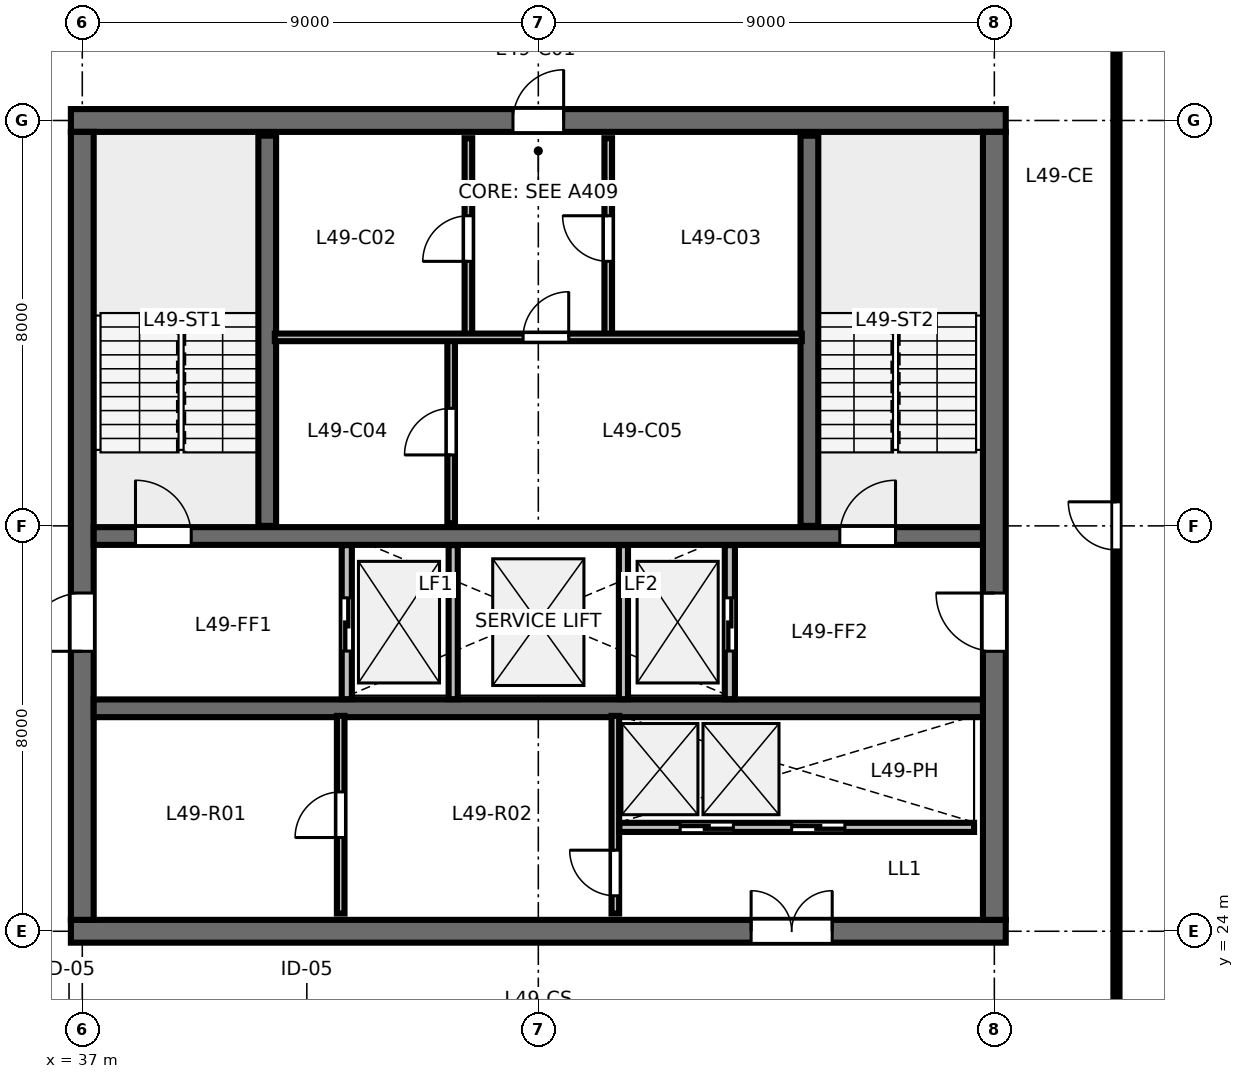
"""IFC4 building model, lengths in metres.
Left out: names, types, materials, properties, quantities, classifications, styles, units other than length and angle.
Written with IfcOpenShell. Run it as: python <this file> out.ifc"""

import sys

from ifc_helpers import new_model, si_unit, direction, frame, frame_2d, origin, place, context, subcontext, project, spatial, rectangle, extrude, element, fill, save


model = new_model("IFC4")
c1 = context("Model", 3, precision=1e-05, world=origin(), true_north=direction((0.0, 1.0)))
c2 = subcontext(c1, "Body", "Model", "MODEL_VIEW")
j1 = project(units=[si_unit("LENGTHUNIT", "METRE"), si_unit("PLANEANGLEUNIT", "RADIAN")], contexts=[c1])
p1 = place(None, origin())
s1 = spatial("IfcSite", under=j1, at=p1, CompositionType="ELEMENT")
p2 = place(p1, origin())
s2 = spatial("IfcBuilding", under=s1, at=p2, CompositionType="ELEMENT")
p3 = place(p2, frame((0.0, 0.0, 187.8)))
s3 = spatial("IfcBuildingStorey", under=s2, at=p3, CompositionType="ELEMENT", Elevation=187.8)
p4 = place(p3, frame((36.775, 24.0, 0.0), z_axis=(0.0, 0.0, 1.0), x_axis=(1.0, 0.0, 0.0)))
e1 = element("IfcWall", 1, at=p4, inside=s3, PredefinedType="SHEAR", context=c2, shape_type="SweptSolid", body=[
    extrude(rectangle(XDim=18.45, YDim=0.45, at=frame_2d((9.225, 0.0))), origin(), (0.0, 0.0, 1.0), 3.36),
])
p5 = place(p4, frame((13.425, 0.0, 0.0)))
e2 = element("IfcOpeningElement", 2, at=p5, cuts=e1, PredefinedType="OPENING", context=c2, shape_type="SweptSolid", body=[
    extrude(rectangle(XDim=1.6, YDim=2.15, at=frame_2d((0.8, 1.075))), frame((0.0, 0.235, 0.0), z_axis=(0.0, -1.0, 0.0), x_axis=(1.0, 0.0, 0.0)), (0.0, 0.0, 1.0), 0.47),
])
p6 = place(p3, frame((36.775, 40.0, 0.0), z_axis=(0.0, 0.0, 1.0), x_axis=(1.0, 0.0, 0.0)))
e3 = element("IfcWall", 3, at=p6, inside=s3, PredefinedType="SHEAR", context=c2, shape_type="SweptSolid", body=[
    extrude(rectangle(XDim=18.45, YDim=0.45, at=frame_2d((9.225, 0.0))), origin(), (0.0, 0.0, 1.0), 3.36),
])
p7 = place(p6, frame((8.725, 0.0, 0.0)))
e4 = element("IfcOpeningElement", 4, at=p7, cuts=e3, PredefinedType="OPENING", context=c2, shape_type="SweptSolid", body=[
    extrude(rectangle(XDim=1.0, YDim=2.15, at=frame_2d((0.5, 1.075))), frame((0.0, 0.235, 0.0), z_axis=(0.0, -1.0, 0.0), x_axis=(1.0, 0.0, 0.0)), (0.0, 0.0, 1.0), 0.47),
])
p8 = place(p3, frame((37.0, 24.225, 0.0), z_axis=(0.0, 0.0, 1.0), x_axis=(0.0, 1.0, 0.0)))
e5 = element("IfcWall", 5, at=p8, inside=s3, PredefinedType="SHEAR", context=c2, shape_type="SweptSolid", body=[
    extrude(rectangle(XDim=15.55, YDim=0.45, at=frame_2d((7.775, 0.0))), origin(), (0.0, 0.0, 1.0), 3.36),
])
p9 = place(p8, frame((5.3, 0.0, 0.0)))
e6 = element("IfcOpeningElement", 6, at=p9, cuts=e5, PredefinedType="OPENING", context=c2, shape_type="SweptSolid", body=[
    extrude(rectangle(XDim=1.15, YDim=2.15, at=frame_2d((0.575, 1.075))), frame((0.0, 0.235, 0.0), z_axis=(0.0, -1.0, 0.0), x_axis=(1.0, 0.0, 0.0)), (0.0, 0.0, 1.0), 0.47),
])
p10 = place(p3, frame((55.0, 24.225, 0.0), z_axis=(0.0, 0.0, 1.0), x_axis=(0.0, 1.0, 0.0)))
e7 = element("IfcWall", 7, at=p10, inside=s3, PredefinedType="SHEAR", context=c2, shape_type="SweptSolid", body=[
    extrude(rectangle(XDim=15.55, YDim=0.45, at=frame_2d((7.775, 0.0))), origin(), (0.0, 0.0, 1.0), 3.36),
])
p11 = place(p10, frame((5.3, 0.0, 0.0)))
e8 = element("IfcOpeningElement", 8, at=p11, cuts=e7, PredefinedType="OPENING", context=c2, shape_type="SweptSolid", body=[
    extrude(rectangle(XDim=1.15, YDim=2.15, at=frame_2d((0.575, 1.075))), frame((0.0, 0.235, 0.0), z_axis=(0.0, -1.0, 0.0), x_axis=(1.0, 0.0, 0.0)), (0.0, 0.0, 1.0), 0.47),
])
p12 = place(p3, frame((37.225, 31.8, 0.0), z_axis=(0.0, 0.0, 1.0), x_axis=(1.0, 0.0, 0.0)))
e9 = element("IfcWall", 9, at=p12, inside=s3, PredefinedType="SHEAR", context=c2, shape_type="SweptSolid", body=[
    extrude(rectangle(XDim=17.55, YDim=0.35, at=frame_2d((8.775, 0.0))), origin(), (0.0, 0.0, 1.0), 3.36),
])
p13 = place(p12, frame((0.825, 0.0, 0.0)))
e10 = element("IfcOpeningElement", 10, at=p13, cuts=e9, PredefinedType="OPENING", context=c2, shape_type="SweptSolid", body=[
    extrude(rectangle(XDim=1.1, YDim=2.15, at=frame_2d((0.55, 1.075))), frame((0.0, 0.185, 0.0), z_axis=(0.0, -1.0, 0.0), x_axis=(1.0, 0.0, 0.0)), (0.0, 0.0, 1.0), 0.37),
])
p14 = place(p12, frame((14.725, 0.0, 0.0)))
e11 = element("IfcOpeningElement", 11, at=p14, cuts=e9, PredefinedType="OPENING", context=c2, shape_type="SweptSolid", body=[
    extrude(rectangle(XDim=1.1, YDim=2.15, at=frame_2d((0.55, 1.075))), frame((0.0, 0.185, 0.0), z_axis=(0.0, -1.0, 0.0), x_axis=(1.0, 0.0, 0.0)), (0.0, 0.0, 1.0), 0.37),
])
p15 = place(p3, frame((37.225, 28.4, 0.0), z_axis=(0.0, 0.0, 1.0), x_axis=(1.0, 0.0, 0.0)))
e12 = element("IfcWall", 12, at=p15, inside=s3, PredefinedType="SHEAR", context=c2, shape_type="SweptSolid", body=[
    extrude(rectangle(XDim=17.55, YDim=0.35, at=frame_2d((8.775, 0.0))), origin(), (0.0, 0.0, 1.0), 3.36),
])
for number, where, z_axis, x_axis in (
    (13, (40.65, 32.0, 0.0), (0.0, 0.0, 1.0), (0.0, 1.0, 0.0)),
    (14, (51.35, 32.0, 0.0), (0.0, 0.0, 1.0), (0.0, 1.0, 0.0)),
):
    element("IfcWall", number, at=place(p3, frame(where, z_axis=z_axis, x_axis=x_axis)), inside=s3, PredefinedType="SHEAR", context=c2, shape_type="SweptSolid", body=[
        extrude(rectangle(XDim=7.7, YDim=0.35, at=frame_2d((3.85, 0.0))), origin(), (0.0, 0.0, 1.0), 3.6),
    ])
p16 = place(p3, frame((44.62, 35.72, 0.0), z_axis=(0.0, 0.0, 1.0), x_axis=(0.0, 1.0, 0.0)))
e15 = element("IfcWall", 15, at=p16, inside=s3, PredefinedType="PARTITIONING", context=c2, shape_type="SweptSolid", body=[
    extrude(rectangle(XDim=3.93, YDim=0.15, at=frame_2d((1.965, 0.0))), origin(), (0.0, 0.0, 1.0), 3.375),
])
p17 = place(p16, frame((1.5, 0.0, 0.0)))
e16 = element("IfcOpeningElement", 16, at=p17, cuts=e15, PredefinedType="OPENING", context=c2, shape_type="SweptSolid", body=[
    extrude(rectangle(XDim=0.9, YDim=2.15, at=frame_2d((0.45, 1.075))), frame((0.0, 0.085, 0.0), z_axis=(0.0, -1.0, 0.0), x_axis=(1.0, 0.0, 0.0)), (0.0, 0.0, 1.0), 0.17),
])
p18 = place(p3, frame((47.38, 35.72, 0.0), z_axis=(0.0, 0.0, 1.0), x_axis=(0.0, 1.0, 0.0)))
e17 = element("IfcWall", 17, at=p18, inside=s3, PredefinedType="PARTITIONING", context=c2, shape_type="SweptSolid", body=[
    extrude(rectangle(XDim=3.93, YDim=0.15, at=frame_2d((1.965, 0.0))), origin(), (0.0, 0.0, 1.0), 3.375),
])
p19 = place(p18, frame((1.5, 0.0, 0.0)))
e18 = element("IfcOpeningElement", 18, at=p19, cuts=e17, PredefinedType="OPENING", context=c2, shape_type="SweptSolid", body=[
    extrude(rectangle(XDim=0.9, YDim=2.15, at=frame_2d((0.45, 1.075))), frame((0.0, 0.085, 0.0), z_axis=(0.0, -1.0, 0.0), x_axis=(1.0, 0.0, 0.0)), (0.0, 0.0, 1.0), 0.17),
])
p20 = place(p3, frame((44.28, 32.05, 0.0), z_axis=(0.0, 0.0, 1.0), x_axis=(0.0, 1.0, 0.0)))
e19 = element("IfcWall", 19, at=p20, inside=s3, PredefinedType="PARTITIONING", context=c2, shape_type="SweptSolid", body=[
    extrude(rectangle(XDim=3.67, YDim=0.15, at=frame_2d((1.835, 0.0))), origin(), (0.0, 0.0, 1.0), 3.375),
])
p21 = place(p20, frame((1.35, 0.0, 0.0)))
e20 = element("IfcOpeningElement", 20, at=p21, cuts=e19, PredefinedType="OPENING", context=c2, shape_type="SweptSolid", body=[
    extrude(rectangle(XDim=0.92, YDim=2.15, at=frame_2d((0.46, 1.075))), frame((0.0, 0.085, 0.0), z_axis=(0.0, -1.0, 0.0), x_axis=(1.0, 0.0, 0.0)), (0.0, 0.0, 1.0), 0.17),
])
p22 = place(p3, frame((40.8, 35.72, 0.0), z_axis=(0.0, 0.0, 1.0), x_axis=(1.0, 0.0, 0.0)))
e21 = element("IfcWall", 21, at=p22, inside=s3, PredefinedType="PARTITIONING", context=c2, shape_type="SweptSolid", body=[
    extrude(rectangle(XDim=10.4, YDim=0.15, at=frame_2d((5.2, 0.0))), origin(), (0.0, 0.0, 1.0), 3.375),
])
p23 = place(p22, frame((4.9, 0.0, 0.0)))
e22 = element("IfcOpeningElement", 22, at=p23, cuts=e21, PredefinedType="OPENING", context=c2, shape_type="SweptSolid", body=[
    extrude(rectangle(XDim=0.9, YDim=2.15, at=frame_2d((0.45, 1.075))), frame((0.0, 0.085, 0.0), z_axis=(0.0, -1.0, 0.0), x_axis=(1.0, 0.0, 0.0)), (0.0, 0.0, 1.0), 0.17),
])
p24 = place(p3, frame((42.22, 28.58, 0.0), z_axis=(0.0, 0.0, 1.0), x_axis=(0.0, 1.0, 0.0)))
e23 = element("IfcWall", 23, at=p24, inside=s3, PredefinedType="PARTITIONING", context=c2, shape_type="SweptSolid", body=[
    extrude(rectangle(XDim=3.04, YDim=0.2, at=frame_2d((1.52, 0.0))), origin(), (0.0, 0.0, 1.0), 3.375),
])
p25 = place(p24, frame((0.95, 0.0, 0.0)))
e24 = element("IfcOpeningElement", 24, at=p25, cuts=e23, PredefinedType="OPENING", context=c2, shape_type="SweptSolid", body=[
    extrude(rectangle(XDim=1.05, YDim=2.15, at=frame_2d((0.525, 1.075))), frame((0.0, 0.11, 0.0), z_axis=(0.0, -1.0, 0.0), x_axis=(1.0, 0.0, 0.0)), (0.0, 0.0, 1.0), 0.22),
])
p26 = place(p3, frame((49.78, 28.58, 0.0), z_axis=(0.0, 0.0, 1.0), x_axis=(0.0, 1.0, 0.0)))
e25 = element("IfcWall", 25, at=p26, inside=s3, PredefinedType="PARTITIONING", context=c2, shape_type="SweptSolid", body=[
    extrude(rectangle(XDim=3.04, YDim=0.2, at=frame_2d((1.52, 0.0))), origin(), (0.0, 0.0, 1.0), 3.375),
])
p27 = place(p26, frame((0.95, 0.0, 0.0)))
e26 = element("IfcOpeningElement", 26, at=p27, cuts=e25, PredefinedType="OPENING", context=c2, shape_type="SweptSolid", body=[
    extrude(rectangle(XDim=1.05, YDim=2.15, at=frame_2d((0.525, 1.075))), frame((0.0, 0.11, 0.0), z_axis=(0.0, -1.0, 0.0), x_axis=(1.0, 0.0, 0.0)), (0.0, 0.0, 1.0), 0.22),
])
for number, where, z_axis, x_axis in (
    (27, (44.32, 28.58, 0.0), (0.0, 0.0, 1.0), (0.0, 1.0, 0.0)),
    (28, (47.68, 28.58, 0.0), (0.0, 0.0, 1.0), (0.0, 1.0, 0.0)),
):
    element("IfcWall", number, at=place(p3, frame(where, z_axis=z_axis, x_axis=x_axis)), inside=s3, PredefinedType="PARTITIONING", context=c2, shape_type="SweptSolid", body=[
        extrude(rectangle(XDim=3.04, YDim=0.18, at=frame_2d((1.52, 0.0))), origin(), (0.0, 0.0, 1.0), 3.375),
    ])
p28 = place(p3, frame((42.1, 24.35, 0.0), z_axis=(0.0, 0.0, 1.0), x_axis=(0.0, 1.0, 0.0)))
e29 = element("IfcWall", 29, at=p28, inside=s3, PredefinedType="PARTITIONING", context=c2, shape_type="SweptSolid", body=[
    extrude(rectangle(XDim=3.9, YDim=0.15, at=frame_2d((1.95, 0.0))), origin(), (0.0, 0.0, 1.0), 3.375),
])
p29 = place(p28, frame((1.5, 0.0, 0.0)))
e30 = element("IfcOpeningElement", 30, at=p29, cuts=e29, PredefinedType="OPENING", context=c2, shape_type="SweptSolid", body=[
    extrude(rectangle(XDim=0.9, YDim=2.15, at=frame_2d((0.45, 1.075))), frame((0.0, 0.085, 0.0), z_axis=(0.0, -1.0, 0.0), x_axis=(1.0, 0.0, 0.0)), (0.0, 0.0, 1.0), 0.17),
])
p30 = place(p3, frame((47.52, 24.35, 0.0), z_axis=(0.0, 0.0, 1.0), x_axis=(0.0, 1.0, 0.0)))
e31 = element("IfcWall", 31, at=p30, inside=s3, PredefinedType="PARTITIONING", context=c2, shape_type="SweptSolid", body=[
    extrude(rectangle(XDim=3.9, YDim=0.15, at=frame_2d((1.95, 0.0))), origin(), (0.0, 0.0, 1.0), 3.375),
])
p31 = place(p30, frame((0.35, 0.0, 0.0)))
e32 = element("IfcOpeningElement", 32, at=p31, cuts=e31, PredefinedType="OPENING", context=c2, shape_type="SweptSolid", body=[
    extrude(rectangle(XDim=0.9, YDim=2.15, at=frame_2d((0.45, 1.075))), frame((0.0, 0.085, 0.0), z_axis=(0.0, -1.0, 0.0), x_axis=(1.0, 0.0, 0.0)), (0.0, 0.0, 1.0), 0.17),
])
p32 = place(p3, frame((47.6, 26.05, 0.0), z_axis=(0.0, 0.0, 1.0), x_axis=(1.0, 0.0, 0.0)))
e33 = element("IfcWall", 33, at=p32, inside=s3, PredefinedType="PARTITIONING", context=c2, shape_type="SweptSolid", body=[
    extrude(rectangle(XDim=7.0, YDim=0.18, at=frame_2d((3.5, 0.0))), origin(), (0.0, 0.0, 1.0), 3.375),
])
p33 = place(p32, frame((1.2, 0.0, 0.0)))
e34 = element("IfcOpeningElement", 34, at=p33, cuts=e33, PredefinedType="OPENING", context=c2, shape_type="SweptSolid", body=[
    extrude(rectangle(XDim=1.05, YDim=2.15, at=frame_2d((0.525, 1.075))), frame((0.0, 0.1, 0.0), z_axis=(0.0, -1.0, 0.0), x_axis=(1.0, 0.0, 0.0)), (0.0, 0.0, 1.0), 0.2),
])
p34 = place(p32, frame((3.4, 0.0, 0.0)))
e35 = element("IfcOpeningElement", 35, at=p34, cuts=e33, PredefinedType="OPENING", context=c2, shape_type="SweptSolid", body=[
    extrude(rectangle(XDim=1.05, YDim=2.15, at=frame_2d((0.525, 1.075))), frame((0.0, 0.1, 0.0), z_axis=(0.0, -1.0, 0.0), x_axis=(1.0, 0.0, 0.0)), (0.0, 0.0, 1.0), 0.2),
])
p35 = place(p3, frame((57.41, 21.65, 0.0), z_axis=(0.0, 0.0, 1.0), x_axis=(0.0, 1.0, 0.0)))
e36 = element("IfcWall", 36, at=p35, inside=s3, PredefinedType="PARTITIONING", context=c2, shape_type="SweptSolid", body=[
    extrude(rectangle(XDim=20.7, YDim=0.12, at=frame_2d((10.35, 0.0))), origin(), (0.0, 0.0, 1.0), 2.655),
])
p36 = place(p35, frame((9.875, 0.0, 0.0)))
e37 = element("IfcOpeningElement", 37, at=p36, cuts=e36, PredefinedType="OPENING", context=c2, shape_type="SweptSolid", body=[
    extrude(rectangle(XDim=0.95, YDim=2.15, at=frame_2d((0.475, 1.075))), frame((0.0, 0.07, 0.0), z_axis=(0.0, -1.0, 0.0), x_axis=(1.0, 0.0, 0.0)), (0.0, 0.0, 1.0), 0.14),
])
p37 = place(p13, origin())
e38 = element("IfcDoor", 38, at=p37, inside=s3, OperationType="SINGLE_SWING_LEFT", PredefinedType="DOOR", context=c2, shape_type="SweptSolid", body=[
    extrude(rectangle(XDim=1.1, YDim=2.15, at=frame_2d((0.55, 1.075))), frame((0.0, 0.025, 0.0), z_axis=(0.0, -1.0, 0.0), x_axis=(1.0, 0.0, 0.0)), (0.0, 0.0, 1.0), 0.05),
])
fill(e10, e38)
p38 = place(p14, origin())
e39 = element("IfcDoor", 39, at=p38, inside=s3, OperationType="SINGLE_SWING_RIGHT", PredefinedType="DOOR", context=c2, shape_type="SweptSolid", body=[
    extrude(rectangle(XDim=1.1, YDim=2.15, at=frame_2d((0.55, 1.075))), frame((0.0, 0.025, 0.0), z_axis=(0.0, -1.0, 0.0), x_axis=(1.0, 0.0, 0.0)), (0.0, 0.0, 1.0), 0.05),
])
fill(e11, e39)
p39 = place(p7, origin())
e40 = element("IfcDoor", 40, at=p39, inside=s3, OperationType="SINGLE_SWING_RIGHT", PredefinedType="DOOR", context=c2, shape_type="SweptSolid", body=[
    extrude(rectangle(XDim=1.0, YDim=2.15, at=frame_2d((0.5, 1.075))), frame((0.0, 0.025, 0.0), z_axis=(0.0, -1.0, 0.0), x_axis=(1.0, 0.0, 0.0)), (0.0, 0.0, 1.0), 0.05),
])
fill(e4, e40)
p40 = place(p9, origin())
e41 = element("IfcDoor", 41, at=p40, inside=s3, OperationType="SINGLE_SWING_LEFT", PredefinedType="DOOR", context=c2, shape_type="SweptSolid", body=[
    extrude(rectangle(XDim=1.15, YDim=2.15, at=frame_2d((0.575, 1.075))), frame((0.0, 0.025, 0.0), z_axis=(0.0, -1.0, 0.0), x_axis=(1.0, 0.0, 0.0)), (0.0, 0.0, 1.0), 0.05),
])
fill(e6, e41)
p41 = place(p11, origin())
e42 = element("IfcDoor", 42, at=p41, inside=s3, OperationType="SINGLE_SWING_RIGHT", PredefinedType="DOOR", context=c2, shape_type="SweptSolid", body=[
    extrude(rectangle(XDim=1.15, YDim=2.15, at=frame_2d((0.575, 1.075))), frame((0.0, 0.025, 0.0), z_axis=(0.0, -1.0, 0.0), x_axis=(1.0, 0.0, 0.0)), (0.0, 0.0, 1.0), 0.05),
])
fill(e8, e42)
p42 = place(p5, origin())
e43 = element("IfcDoor", 43, at=p42, inside=s3, OperationType="DOUBLE_DOOR_SINGLE_SWING", PredefinedType="DOOR", context=c2, shape_type="SweptSolid", body=[
    extrude(rectangle(XDim=1.6, YDim=2.15, at=frame_2d((0.8, 1.075))), frame((0.0, 0.025, 0.0), z_axis=(0.0, -1.0, 0.0), x_axis=(1.0, 0.0, 0.0)), (0.0, 0.0, 1.0), 0.05),
])
fill(e2, e43)
p43 = place(p17, origin())
e44 = element("IfcDoor", 44, at=p43, inside=s3, OperationType="SINGLE_SWING_LEFT", PredefinedType="DOOR", context=c2, shape_type="SweptSolid", body=[
    extrude(rectangle(XDim=0.9, YDim=2.15, at=frame_2d((0.45, 1.075))), frame((0.0, 0.025, 0.0), z_axis=(0.0, -1.0, 0.0), x_axis=(1.0, 0.0, 0.0)), (0.0, 0.0, 1.0), 0.05),
])
fill(e16, e44)
p44 = place(p19, origin())
e45 = element("IfcDoor", 45, at=p44, inside=s3, OperationType="SINGLE_SWING_RIGHT", PredefinedType="DOOR", context=c2, shape_type="SweptSolid", body=[
    extrude(rectangle(XDim=0.9, YDim=2.15, at=frame_2d((0.45, 1.075))), frame((0.0, 0.025, 0.0), z_axis=(0.0, -1.0, 0.0), x_axis=(1.0, 0.0, 0.0)), (0.0, 0.0, 1.0), 0.05),
])
fill(e18, e45)
p45 = place(p21, origin())
e46 = element("IfcDoor", 46, at=p45, inside=s3, OperationType="SINGLE_SWING_LEFT", PredefinedType="DOOR", context=c2, shape_type="SweptSolid", body=[
    extrude(rectangle(XDim=0.92, YDim=2.15, at=frame_2d((0.46, 1.075))), frame((0.0, 0.025, 0.0), z_axis=(0.0, -1.0, 0.0), x_axis=(1.0, 0.0, 0.0)), (0.0, 0.0, 1.0), 0.05),
])
fill(e20, e46)
p46 = place(p23, origin())
e47 = element("IfcDoor", 47, at=p46, inside=s3, OperationType="SINGLE_SWING_RIGHT", PredefinedType="DOOR", context=c2, shape_type="SweptSolid", body=[
    extrude(rectangle(XDim=0.9, YDim=2.15, at=frame_2d((0.45, 1.075))), frame((0.0, 0.025, 0.0), z_axis=(0.0, -1.0, 0.0), x_axis=(1.0, 0.0, 0.0)), (0.0, 0.0, 1.0), 0.05),
])
fill(e22, e47)
p47 = place(p25, origin())
e48 = element("IfcDoor", 48, at=p47, inside=s3, OperationType="SLIDING_TO_LEFT", PredefinedType="DOOR", context=c2, shape_type="SweptSolid", body=[
    extrude(rectangle(XDim=1.05, YDim=2.15, at=frame_2d((0.525, 1.075))), frame((0.0, 0.025, 0.0), z_axis=(0.0, -1.0, 0.0), x_axis=(1.0, 0.0, 0.0)), (0.0, 0.0, 1.0), 0.05),
])
fill(e24, e48)
p48 = place(p27, origin())
e49 = element("IfcDoor", 49, at=p48, inside=s3, OperationType="SLIDING_TO_RIGHT", PredefinedType="DOOR", context=c2, shape_type="SweptSolid", body=[
    extrude(rectangle(XDim=1.05, YDim=2.15, at=frame_2d((0.525, 1.075))), frame((0.0, 0.025, 0.0), z_axis=(0.0, -1.0, 0.0), x_axis=(1.0, 0.0, 0.0)), (0.0, 0.0, 1.0), 0.05),
])
fill(e26, e49)
p49 = place(p29, origin())
e50 = element("IfcDoor", 50, at=p49, inside=s3, OperationType="SINGLE_SWING_LEFT", PredefinedType="DOOR", context=c2, shape_type="SweptSolid", body=[
    extrude(rectangle(XDim=0.9, YDim=2.15, at=frame_2d((0.45, 1.075))), frame((0.0, 0.025, 0.0), z_axis=(0.0, -1.0, 0.0), x_axis=(1.0, 0.0, 0.0)), (0.0, 0.0, 1.0), 0.05),
])
fill(e30, e50)
p50 = place(p31, origin())
e51 = element("IfcDoor", 51, at=p50, inside=s3, OperationType="SINGLE_SWING_RIGHT", PredefinedType="DOOR", context=c2, shape_type="SweptSolid", body=[
    extrude(rectangle(XDim=0.9, YDim=2.15, at=frame_2d((0.45, 1.075))), frame((0.0, 0.025, 0.0), z_axis=(0.0, -1.0, 0.0), x_axis=(1.0, 0.0, 0.0)), (0.0, 0.0, 1.0), 0.05),
])
fill(e32, e51)
p51 = place(p33, origin())
e52 = element("IfcDoor", 52, at=p51, inside=s3, OperationType="SLIDING_TO_LEFT", PredefinedType="DOOR", context=c2, shape_type="SweptSolid", body=[
    extrude(rectangle(XDim=1.05, YDim=2.15, at=frame_2d((0.525, 1.075))), frame((0.0, 0.025, 0.0), z_axis=(0.0, -1.0, 0.0), x_axis=(1.0, 0.0, 0.0)), (0.0, 0.0, 1.0), 0.05),
])
fill(e34, e52)
p52 = place(p34, origin())
e53 = element("IfcDoor", 53, at=p52, inside=s3, OperationType="SLIDING_TO_RIGHT", PredefinedType="DOOR", context=c2, shape_type="SweptSolid", body=[
    extrude(rectangle(XDim=1.05, YDim=2.15, at=frame_2d((0.525, 1.075))), frame((0.0, 0.025, 0.0), z_axis=(0.0, -1.0, 0.0), x_axis=(1.0, 0.0, 0.0)), (0.0, 0.0, 1.0), 0.05),
])
fill(e35, e53)
p53 = place(p36, origin())
e54 = element("IfcDoor", 54, at=p53, inside=s3, OperationType="SINGLE_SWING_RIGHT", PredefinedType="DOOR", context=c2, shape_type="SweptSolid", body=[
    extrude(rectangle(XDim=0.95, YDim=2.15, at=frame_2d((0.475, 1.075))), frame((0.0, 0.025, 0.0), z_axis=(0.0, -1.0, 0.0), x_axis=(1.0, 0.0, 0.0)), (0.0, 0.0, 1.0), 0.05),
])
fill(e37, e54)
save(model, sys.argv[1])
